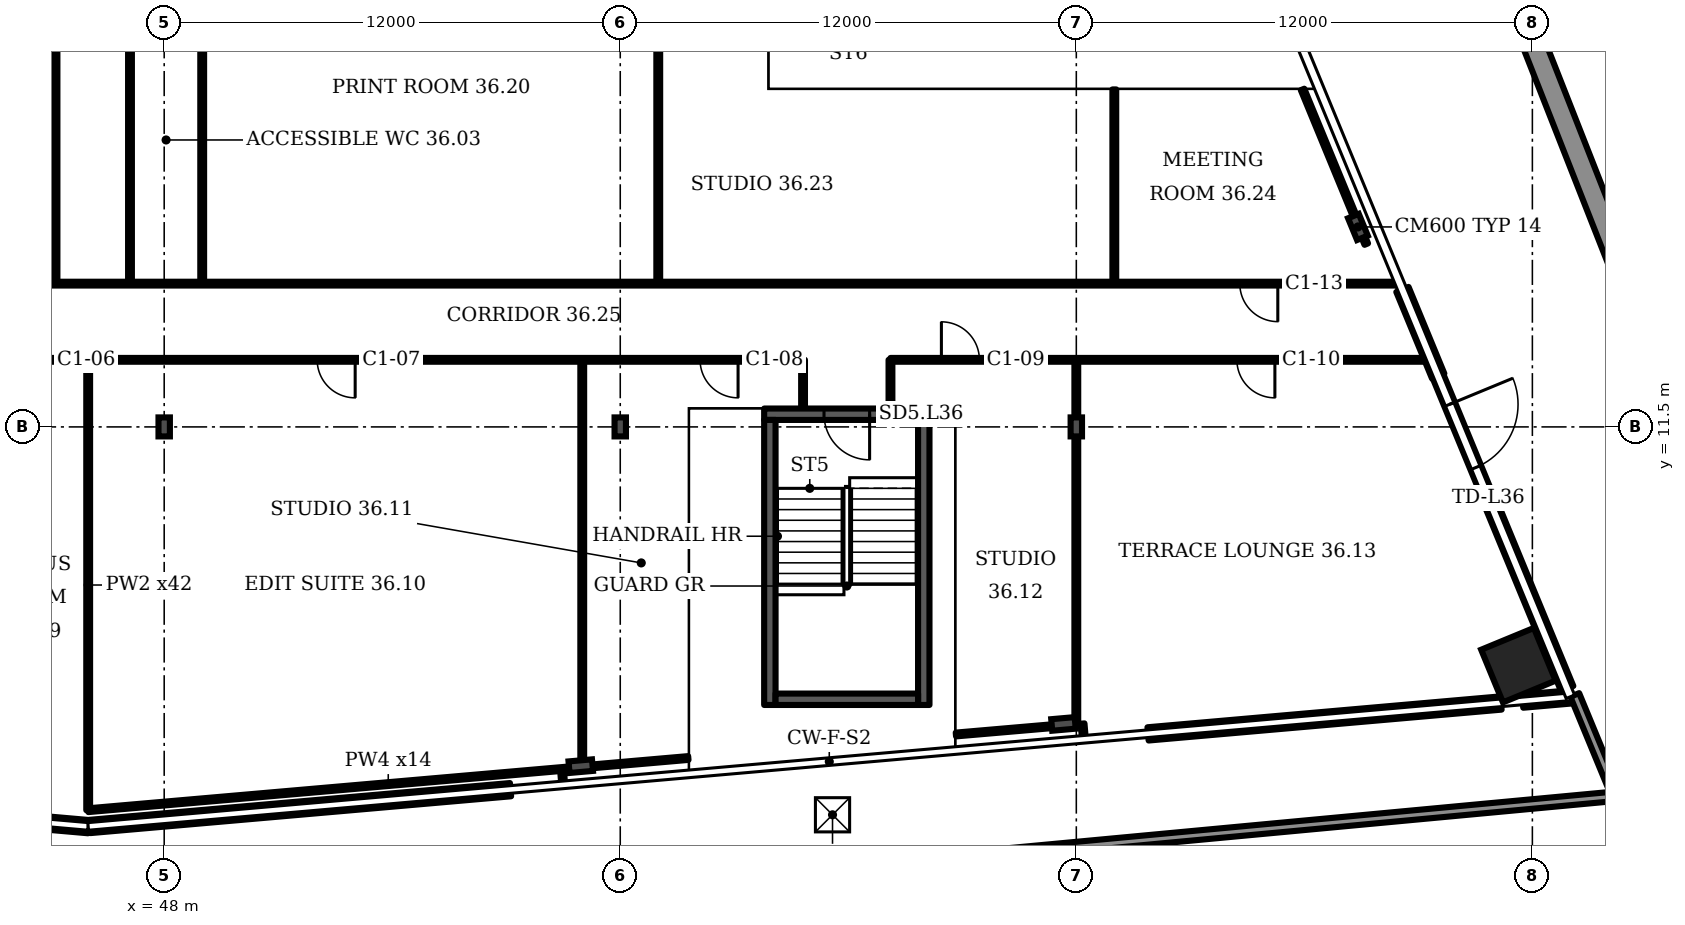
"""IFC4 building model, lengths in metres.
Left out: names, types, materials, properties, quantities, classifications, styles, units other than length and angle.
Written with IfcOpenShell. Run it as: python <this file> out.ifc"""

import sys

from ifc_helpers import new_model, si_unit, direction, frame, frame_2d, origin, origin_2d, place, context, subcontext, project, spatial, rectangle, i_section, extrude, element, fill, save


model = new_model("IFC4")
c1 = context("Model", 3, precision=1e-05, world=origin(), true_north=direction((0.0, 1.0)))
c2 = subcontext(c1, "Body", "Model", "MODEL_VIEW")
j1 = project(units=[si_unit("LENGTHUNIT", "METRE"), si_unit("PLANEANGLEUNIT", "RADIAN")], contexts=[c1])
p1 = place(None, origin())
s1 = spatial("IfcSite", under=j1, at=p1, CompositionType="ELEMENT")
p2 = place(p1, origin())
s2 = spatial("IfcBuilding", under=s1, at=p2, CompositionType="ELEMENT")
p3 = place(p2, frame((0.0, 0.0, 151.9)))
s3 = spatial("IfcBuildingStorey", under=s2, at=p3, CompositionType="ELEMENT", Elevation=151.9)
p4 = place(p3, frame((83.633, 5.231, 0.0), z_axis=(0.0, 0.0, 1.0), x_axis=(-0.381602, 0.924325, 0.0)))
e1 = element("IfcColumn", 1, at=p4, inside=s3, PredefinedType="COLUMN", context=c2, shape_type="SweptSolid", body=[
    extrude(rectangle(XDim=1.5, YDim=1.5, at=origin_2d()), origin(), (0.0, 0.0, 1.0), 3.6),
])
for number, where, z_axis, x_axis in (
    (2, (58.961, 2.573, 0.0), (0.0, 0.0, 1.0), (0.087, -0.996, 0.0)),
    (3, (71.662, 3.685, 0.0), (0.0, 0.0, 1.0), (0.087, -0.996, 0.0)),
    (4, (79.41, 16.762, 0.0), (0.0, 0.0, 1.0), (0.924, 0.382, 0.0)),
):
    element("IfcColumn", number, at=place(p3, frame(where, z_axis=z_axis, x_axis=x_axis)), inside=s3, PredefinedType="COLUMN", context=c2, shape_type="SweptSolid", body=[
        extrude(i_section(OverallWidth=0.305, OverallDepth=0.62, WebThickness=0.021, FlangeThickness=0.04, FilletRadius=0.027, at=origin_2d()), origin(), (0.0, 0.0, 1.0), 3.6),
    ])
for number, where, z_axis, x_axis in (
    (5, (48.0, 11.5, 0.0), (0.0, 0.0, 1.0), (1.0, 0.0, 0.0)),
    (6, (60.0, 11.5, 0.0), (0.0, 0.0, 1.0), (1.0, 0.0, 0.0)),
    (7, (72.0, 11.5, 0.0), (0.0, 0.0, 1.0), (1.0, 0.0, 0.0)),
):
    element("IfcColumn", number, at=place(p3, frame(where, z_axis=z_axis, x_axis=x_axis)), inside=s3, PredefinedType="COLUMN", context=c2, shape_type="SweptSolid", body=[
        extrude(i_section(OverallWidth=0.3, OverallDepth=0.5, WebThickness=0.014, FlangeThickness=0.028, FilletRadius=0.027, at=origin_2d()), origin(), (0.0, 0.0, 1.0), 3.6),
    ])
p5 = place(p3, frame((91.865, 2.313, 0.0), z_axis=(0.0, 0.0, 1.0), x_axis=(-0.995663, -0.092993, 0.0)))
e8 = element("IfcWall", 8, at=p5, inside=s3, PredefinedType="PARAPET", context=c2, shape_type="SweptSolid", body=[
    extrude(rectangle(XDim=42.549, YDim=0.25, at=frame_2d((21.274, 0.0))), origin(), (0.0, 0.0, 1.0), 1.1),
])
p6 = place(p3, frame((49.47, -1.641, 0.0), z_axis=(0.0, 0.0, 1.0), x_axis=(-0.996194, 0.087158, 0.0)))
e9 = element("IfcWall", 9, at=p6, inside=s3, PredefinedType="PARAPET", context=c2, shape_type="SweptSolid", body=[
    extrude(rectangle(XDim=36.86, YDim=0.25, at=frame_2d((18.43, 0.0))), origin(), (0.0, 0.0, 1.0), 1.1),
])
p7 = place(p3, frame((85.115, 4.448, 0.0), z_axis=(0.0, 0.0, 1.0), x_axis=(0.381619, -0.924318, 0.0)))
e10 = element("IfcWall", 10, at=p7, inside=s3, PredefinedType="PARAPET", context=c2, shape_type="SweptSolid", body=[
    extrude(rectangle(XDim=2.71, YDim=0.25, at=frame_2d((1.355, 0.0))), origin(), (0.0, 0.0, 1.0), 1.1),
])
p8 = place(p3, frame((76.426, 40.952, 0.0), z_axis=(0.0, 0.0, 1.0), x_axis=(0.365779, -0.930702, 0.0)))
e11 = element("IfcWall", 11, at=p8, inside=s3, PredefinedType="SOLIDWALL", context=c2, shape_type="SweptSolid", body=[
    extrude(rectangle(XDim=40.163, YDim=0.6, at=frame_2d((20.082, 0.0))), origin(), (0.0, 0.0, 1.0), 0.8),
])
p9 = place(p3, frame((35.03, 1.943, 0.0), z_axis=(0.0, 0.0, 1.0), x_axis=(0.996199, -0.08714, 0.0)))
e12 = element("IfcWall", 12, at=p9, inside=s3, PredefinedType="SOLIDWALL", context=c2, shape_type="SweptSolid", body=[
    extrude(rectangle(XDim=11.028, YDim=0.35, at=frame_2d((5.514, 0.0))), origin(), (0.0, 0.0, 1.0), 1.0),
])
p10 = place(p3, frame((46.045, 0.987, 0.0), z_axis=(0.0, 0.0, 1.0), x_axis=(0.996193, 0.087171, 0.0)))
e13 = element("IfcWall", 13, at=p10, inside=s3, PredefinedType="SOLIDWALL", context=c2, shape_type="SweptSolid", body=[
    extrude(rectangle(XDim=11.11, YDim=0.35, at=frame_2d((5.555, 0.0))), origin(), (0.0, 0.0, 1.0), 1.0),
])
p11 = place(p3, frame((73.887, 3.423, 0.0), z_axis=(0.0, 0.0, 1.0), x_axis=(0.996197, 0.087145, 0.0)))
e14 = element("IfcWall", 14, at=p11, inside=s3, PredefinedType="SOLIDWALL", context=c2, shape_type="SweptSolid", body=[
    extrude(rectangle(XDim=9.323, YDim=0.35, at=frame_2d((4.662, 0.0))), origin(), (0.0, 0.0, 1.0), 1.0),
])
p12 = place(p3, frame((83.745, 4.285, 0.0), z_axis=(0.0, 0.0, 1.0), x_axis=(0.996198, 0.087148, 0.0)))
e15 = element("IfcWall", 15, at=p12, inside=s3, PredefinedType="SOLIDWALL", context=c2, shape_type="SweptSolid", body=[
    extrude(rectangle(XDim=1.261, YDim=0.35, at=frame_2d((0.63, 0.0))), origin(), (0.0, 0.0, 1.0), 1.0),
])
p13 = place(p3, frame((84.916, 4.616, 0.0), z_axis=(0.0, 0.0, 1.0), x_axis=(-0.381607, 0.924328, 0.0)))
e16 = element("IfcWall", 16, at=p13, inside=s3, PredefinedType="SOLIDWALL", context=c2, shape_type="SweptSolid", body=[
    extrude(rectangle(XDim=5.493, YDim=0.35, at=frame_2d((2.747, 0.0))), origin(), (0.0, 0.0, 1.0), 1.0),
])
p14 = place(p3, frame((81.523, 12.836, 0.0), z_axis=(0.0, 0.0, 1.0), x_axis=(-0.381585, 0.924332, 0.0)))
e17 = element("IfcWall", 17, at=p14, inside=s3, PredefinedType="SOLIDWALL", context=c2, shape_type="SweptSolid", body=[
    extrude(rectangle(XDim=2.468, YDim=0.35, at=frame_2d((1.234, 0.0))), origin(), (0.0, 0.0, 1.0), 1.0),
])
p15 = place(p3, frame((63.786, 11.834, 0.0), z_axis=(0.0, 0.0, 1.0), x_axis=(1.0, 0.0, 0.0)))
e18 = element("IfcWall", 18, at=p15, inside=s3, PredefinedType="SHEAR", context=c2, shape_type="SweptSolid", body=[
    extrude(rectangle(XDim=4.35, YDim=0.3, at=frame_2d((2.175, 0.0))), origin(), (0.0, 0.0, 1.0), 3.2),
])
p16 = place(p15, frame((1.575, 0.0, 0.0)))
e19 = element("IfcOpeningElement", 19, at=p16, cuts=e18, PredefinedType="OPENING", context=c2, shape_type="SweptSolid", body=[
    extrude(rectangle(XDim=1.2, YDim=2.1, at=frame_2d((0.6, 1.05))), frame((0.0, 0.16, 0.0), z_axis=(0.0, -1.0, 0.0), x_axis=(1.0, 0.0, 0.0)), (0.0, 0.0, 1.0), 0.32),
])
p17 = place(p3, frame((18.2, 15.27, 0.0), z_axis=(0.0, 0.0, 1.0), x_axis=(1.0, 0.0, 0.0)))
e20 = element("IfcWall", 20, at=p17, inside=s3, PredefinedType="PARTITIONING", context=c2, shape_type="SweptSolid", body=[
    extrude(rectangle(XDim=62.291, YDim=0.1, at=frame_2d((31.146, 0.0))), origin(), (0.0, 0.0, 1.0), 2.58),
])
p18 = place(p17, frame((0.38, 0.0, 0.0)))
e21 = element("IfcOpeningElement", 21, at=p18, cuts=e20, PredefinedType="OPENING", context=c2, shape_type="SweptSolid", body=[
    extrude(rectangle(XDim=1.0, YDim=2.1, at=frame_2d((0.5, 1.05))), frame((0.0, 0.06, 0.0), z_axis=(0.0, -1.0, 0.0), x_axis=(1.0, 0.0, 0.0)), (0.0, 0.0, 1.0), 0.12),
])
p19 = place(p17, frame((58.102, 0.0, 0.0)))
e22 = element("IfcOpeningElement", 22, at=p19, cuts=e20, PredefinedType="OPENING", context=c2, shape_type="SweptSolid", body=[
    extrude(rectangle(XDim=1.0, YDim=2.1, at=frame_2d((0.5, 1.05))), frame((0.0, 0.06, 0.0), z_axis=(0.0, -1.0, 0.0), x_axis=(1.0, 0.0, 0.0)), (0.0, 0.0, 1.0), 0.12),
])
p20 = place(p3, frame((30.69, 13.265, 0.0), z_axis=(0.0, 0.0, 1.0), x_axis=(1.0, 0.0, 0.0)))
e23 = element("IfcWall", 23, at=p20, inside=s3, PredefinedType="PARTITIONING", context=c2, shape_type="SweptSolid", body=[
    extrude(rectangle(XDim=34.12, YDim=0.1, at=frame_2d((17.06, 0.0))), origin(), (0.0, 0.0, 1.0), 3.2),
])
p21 = place(p20, frame((2.825, 0.0, 0.0)))
e24 = element("IfcOpeningElement", 24, at=p21, cuts=e23, PredefinedType="OPENING", context=c2, shape_type="SweptSolid", body=[
    extrude(rectangle(XDim=1.0, YDim=2.1, at=frame_2d((0.5, 1.05))), frame((0.0, 0.06, 0.0), z_axis=(0.0, -1.0, 0.0), x_axis=(1.0, 0.0, 0.0)), (0.0, 0.0, 1.0), 0.12),
])
p22 = place(p20, frame((7.635, 0.0, 0.0)))
e25 = element("IfcOpeningElement", 25, at=p22, cuts=e23, PredefinedType="OPENING", context=c2, shape_type="SweptSolid", body=[
    extrude(rectangle(XDim=1.0, YDim=2.1, at=frame_2d((0.5, 1.05))), frame((0.0, 0.06, 0.0), z_axis=(0.0, -1.0, 0.0), x_axis=(1.0, 0.0, 0.0)), (0.0, 0.0, 1.0), 0.12),
])
p23 = place(p20, frame((10.47, 0.0, 0.0)))
e26 = element("IfcOpeningElement", 26, at=p23, cuts=e23, PredefinedType="OPENING", context=c2, shape_type="SweptSolid", body=[
    extrude(rectangle(XDim=1.0, YDim=2.1, at=frame_2d((0.5, 1.05))), frame((0.0, 0.06, 0.0), z_axis=(0.0, -1.0, 0.0), x_axis=(1.0, 0.0, 0.0)), (0.0, 0.0, 1.0), 0.12),
])
p24 = place(p20, frame((13.305, 0.0, 0.0)))
e27 = element("IfcOpeningElement", 27, at=p24, cuts=e23, PredefinedType="OPENING", context=c2, shape_type="SweptSolid", body=[
    extrude(rectangle(XDim=1.0, YDim=2.1, at=frame_2d((0.5, 1.05))), frame((0.0, 0.06, 0.0), z_axis=(0.0, -1.0, 0.0), x_axis=(1.0, 0.0, 0.0)), (0.0, 0.0, 1.0), 0.12),
])
p25 = place(p20, frame((21.335, 0.0, 0.0)))
e28 = element("IfcOpeningElement", 28, at=p25, cuts=e23, PredefinedType="OPENING", context=c2, shape_type="SweptSolid", body=[
    extrude(rectangle(XDim=1.0, YDim=2.1, at=frame_2d((0.5, 1.05))), frame((0.0, 0.06, 0.0), z_axis=(0.0, -1.0, 0.0), x_axis=(1.0, 0.0, 0.0)), (0.0, 0.0, 1.0), 0.12),
])
p26 = place(p20, frame((31.41, 0.0, 0.0)))
e29 = element("IfcOpeningElement", 29, at=p26, cuts=e23, PredefinedType="OPENING", context=c2, shape_type="SweptSolid", body=[
    extrude(rectangle(XDim=1.0, YDim=2.1, at=frame_2d((0.5, 1.05))), frame((0.0, 0.06, 0.0), z_axis=(0.0, -1.0, 0.0), x_axis=(1.0, 0.0, 0.0)), (0.0, 0.0, 1.0), 0.12),
])
p27 = place(p3, frame((45.14, 15.27, 0.0), z_axis=(0.0, 0.0, 1.0), x_axis=(0.0, 1.0, 0.0)))
e30 = element("IfcWall", 30, at=p27, inside=s3, PredefinedType="PARTITIONING", context=c2, shape_type="SweptSolid", body=[
    extrude(rectangle(XDim=13.43, YDim=0.1, at=frame_2d((6.715, 0.0))), origin(), (0.0, 0.0, 1.0), 3.2),
])
p28 = place(p3, frame((46.0, 1.415, 0.0), z_axis=(0.0, 0.0, 1.0), x_axis=(0.996241, 0.086637, 0.0)))
e31 = element("IfcWall", 31, at=p28, inside=s3, PredefinedType="PARTITIONING", context=c2, shape_type="SweptSolid", body=[
    extrude(rectangle(XDim=15.851, YDim=0.1, at=frame_2d((7.926, 0.0))), origin(), (0.0, 0.0, 1.0), 2.58),
])
p29 = place(p3, frame((46.0, 1.415, 0.0), z_axis=(0.0, 0.0, 1.0), x_axis=(0.0, 1.0, 0.0)))
e32 = element("IfcWall", 32, at=p29, inside=s3, PredefinedType="PARTITIONING", context=c2, shape_type="SweptSolid", body=[
    extrude(rectangle(XDim=11.85, YDim=0.1, at=frame_2d((5.925, 0.0))), origin(), (0.0, 0.0, 1.0), 3.2),
])
for number, where, z_axis, x_axis in (
    (33, (47.1, 15.27, 0.0), (0.0, 0.0, 1.0), (0.0, 1.0, 0.0)),
    (34, (49.0, 15.27, 0.0), (0.0, 0.0, 1.0), (0.0, 1.0, 0.0)),
):
    element("IfcWall", number, at=place(p3, frame(where, z_axis=z_axis, x_axis=x_axis)), inside=s3, PredefinedType="PARTITIONING", context=c2, shape_type="SweptSolid", body=[
        extrude(rectangle(XDim=13.43, YDim=0.1, at=frame_2d((6.715, 0.0))), origin(), (0.0, 0.0, 1.0), 3.2),
    ])
p30 = place(p3, frame((58.498, 2.102, 0.0), z_axis=(0.0, 0.0, 1.0), x_axis=(-0.083045, 0.996542, 0.0)))
e35 = element("IfcWall", 35, at=p30, inside=s3, PredefinedType="PARTITIONING", context=c2, shape_type="SweptSolid", body=[
    extrude(rectangle(XDim=0.4, YDim=0.1, at=frame_2d((0.2, 0.0))), origin(), (0.0, 0.0, 1.0), 3.2),
])
p31 = place(p3, frame((59.0, 2.545, 0.0), z_axis=(0.0, 0.0, 1.0), x_axis=(0.0, 1.0, 0.0)))
e36 = element("IfcWall", 36, at=p31, inside=s3, PredefinedType="PARTITIONING", context=c2, shape_type="SweptSolid", body=[
    extrude(rectangle(XDim=10.72, YDim=0.1, at=frame_2d((5.36, 0.0))), origin(), (0.0, 0.0, 1.0), 3.2),
])
p32 = place(p3, frame((61.0, 15.27, 0.0), z_axis=(0.0, 0.0, 1.0), x_axis=(0.0, 1.0, 0.0)))
e37 = element("IfcWall", 37, at=p32, inside=s3, PredefinedType="PARTITIONING", context=c2, shape_type="SweptSolid", body=[
    extrude(rectangle(XDim=14.33, YDim=0.1, at=frame_2d((7.165, 0.0))), origin(), (0.0, 0.0, 1.0), 3.2),
])
for number, where, z_axis, x_axis in (
    (38, (64.81, 12.004, 0.0), (0.0, 0.0, 1.0), (0.0, 1.0, 0.0)),
    (39, (67.11, 12.004, 0.0), (0.0, 0.0, 1.0), (0.0, 1.0, 0.0)),
):
    element("IfcWall", number, at=place(p3, frame(where, z_axis=z_axis, x_axis=x_axis)), inside=s3, PredefinedType="PARTITIONING", context=c2, shape_type="SweptSolid", body=[
        extrude(rectangle(XDim=1.261, YDim=0.1, at=frame_2d((0.631, 0.0))), origin(), (0.0, 0.0, 1.0), 3.2),
    ])
p33 = place(p3, frame((67.11, 13.265, 0.0), z_axis=(0.0, 0.0, 1.0), x_axis=(1.0, 0.0, 0.0)))
e40 = element("IfcWall", 40, at=p33, inside=s3, PredefinedType="PARTITIONING", context=c2, shape_type="SweptSolid", body=[
    extrude(rectangle(XDim=14.208, YDim=0.1, at=frame_2d((7.104, 0.0))), origin(), (0.0, 0.0, 1.0), 2.58),
])
p34 = place(p33, frame((1.34, 0.0, 0.0)))
e41 = element("IfcOpeningElement", 41, at=p34, cuts=e40, PredefinedType="OPENING", context=c2, shape_type="SweptSolid", body=[
    extrude(rectangle(XDim=1.0, YDim=2.1, at=frame_2d((0.5, 1.05))), frame((0.0, 0.06, 0.0), z_axis=(0.0, -1.0, 0.0), x_axis=(1.0, 0.0, 0.0)), (0.0, 0.0, 1.0), 0.12),
])
p35 = place(p33, frame((9.115, 0.0, 0.0)))
e42 = element("IfcOpeningElement", 42, at=p35, cuts=e40, PredefinedType="OPENING", context=c2, shape_type="SweptSolid", body=[
    extrude(rectangle(XDim=1.0, YDim=2.1, at=frame_2d((0.5, 1.05))), frame((0.0, 0.06, 0.0), z_axis=(0.0, -1.0, 0.0), x_axis=(1.0, 0.0, 0.0)), (0.0, 0.0, 1.0), 0.12),
])
p36 = place(p3, frame((68.831, 3.407, 0.0), z_axis=(0.0, 0.0, 1.0), x_axis=(0.996308, 0.085898, 0.0)))
e43 = element("IfcWall", 43, at=p36, inside=s3, PredefinedType="PARTITIONING", context=c2, shape_type="SweptSolid", body=[
    extrude(rectangle(XDim=3.18, YDim=0.1, at=frame_2d((1.59, 0.0))), origin(), (0.0, 0.0, 1.0), 2.58),
])
p37 = place(p3, frame((72.0, 3.68, 0.0), z_axis=(0.0, 0.0, 1.0), x_axis=(0.0, 1.0, 0.0)))
e44 = element("IfcWall", 44, at=p37, inside=s3, PredefinedType="PARTITIONING", context=c2, shape_type="SweptSolid", body=[
    extrude(rectangle(XDim=9.585, YDim=0.1, at=frame_2d((4.792, 0.0))), origin(), (0.0, 0.0, 1.0), 3.2),
])
p38 = place(p3, frame((72.198, 3.3, 0.0), z_axis=(0.0, 0.0, 1.0), x_axis=(-0.083759, 0.996486, 0.0)))
e45 = element("IfcWall", 45, at=p38, inside=s3, PredefinedType="PARTITIONING", context=c2, shape_type="SweptSolid", body=[
    extrude(rectangle(XDim=0.396, YDim=0.1, at=frame_2d((0.198, 0.0))), origin(), (0.0, 0.0, 1.0), 3.2),
])
p39 = place(p3, frame((73.0, 15.27, 0.0), z_axis=(0.0, 0.0, 1.0), x_axis=(0.0, 1.0, 0.0)))
e46 = element("IfcWall", 46, at=p39, inside=s3, PredefinedType="PARTITIONING", context=c2, shape_type="SweptSolid", body=[
    extrude(rectangle(XDim=5.11, YDim=0.1, at=frame_2d((2.555, 0.0))), origin(), (0.0, 0.0, 1.0), 3.2),
])
p40 = place(p3, frame((79.63, 16.31, 0.0), z_axis=(0.0, 0.0, 1.0), x_axis=(-0.380933, 0.9246, 0.0)))
e47 = element("IfcWall", 47, at=p40, inside=s3, PredefinedType="PARTITIONING", context=c2, shape_type="SweptSolid", body=[
    extrude(rectangle(XDim=4.402, YDim=0.1, at=frame_2d((2.201, 0.0))), origin(), (0.0, 0.0, 1.0), 2.58),
])
p41 = place(p3, frame((81.518, 12.834, 0.0), z_axis=(0.0, 0.0, 1.0), x_axis=(0.381594, -0.924328, 0.0)))
e48 = element("IfcWall", 48, at=p41, inside=s3, PredefinedType="SOLIDWALL", context=c2, shape_type="SweptSolid", body=[
    extrude(rectangle(XDim=3.4, YDim=0.3, at=frame_2d((1.7, 0.0))), origin(), (0.0, 0.0, 1.0), 3.2),
])
p42 = place(p41, frame((0.8, 0.0, 0.0)))
e49 = element("IfcOpeningElement", 49, at=p42, cuts=e48, PredefinedType="OPENING", context=c2, shape_type="SweptSolid", body=[
    extrude(rectangle(XDim=1.8, YDim=2.1, at=frame_2d((0.9, 1.05))), frame((0.0, 0.16, 0.0), z_axis=(0.0, -1.0, 0.0), x_axis=(1.0, 0.0, 0.0)), (0.0, 0.0, 1.0), 0.32),
])
for number, where, z_axis, x_axis in (
    (50, (63.936, 4.184, 0.0), (0.0, 0.0, 1.0), (0.0, 1.0, 0.0)),
    (51, (67.986, 4.184, 0.0), (0.0, 0.0, 1.0), (0.0, 1.0, 0.0)),
):
    element("IfcWall", number, at=place(p3, frame(where, z_axis=z_axis, x_axis=x_axis)), inside=s3, PredefinedType="SHEAR", context=c2, shape_type="SweptSolid", body=[
        extrude(rectangle(XDim=7.5, YDim=0.3, at=frame_2d((3.75, 0.0))), origin(), (0.0, 0.0, 1.0), 3.2),
    ])
p43 = place(p3, frame((64.086, 4.334, 0.0), z_axis=(0.0, 0.0, 1.0), x_axis=(1.0, 0.0, 0.0)))
e52 = element("IfcWall", 52, at=p43, inside=s3, PredefinedType="SHEAR", context=c2, shape_type="SweptSolid", body=[
    extrude(rectangle(XDim=3.75, YDim=0.3, at=frame_2d((1.875, 0.0))), origin(), (0.0, 0.0, 1.0), 3.2),
])
p44 = place(p3, frame((0.0, 0.0, -0.4)))
p45 = place(p44, frame((65.585, 1.294, 0.0)))
p46 = place(p45, frame((0.0, 0.0, 0.36)))
e53 = element("IfcDoor", 53, at=p46, inside=s3, OperationType="SINGLE_SWING_LEFT", PredefinedType="TRAPDOOR", context=c2, shape_type="SweptSolid", body=[
    extrude(rectangle(XDim=0.9, YDim=0.9, at=origin_2d()), origin(), (0.0, 0.0, 1.0), 0.05),
])
p47 = place(p16, origin())
e54 = element("IfcDoor", 54, at=p47, inside=s3, OperationType="SINGLE_SWING_RIGHT", PredefinedType="DOOR", context=c2, shape_type="SweptSolid", body=[
    extrude(rectangle(XDim=1.2, YDim=2.1, at=frame_2d((0.6, 1.05))), frame((0.0, 0.025, 0.0), z_axis=(0.0, -1.0, 0.0), x_axis=(1.0, 0.0, 0.0)), (0.0, 0.0, 1.0), 0.05),
])
fill(e19, e54)
p48 = place(p25, origin())
e55 = element("IfcDoor", 55, at=p48, inside=s3, OperationType="SINGLE_SWING_RIGHT", PredefinedType="DOOR", context=c2, shape_type="SweptSolid", body=[
    extrude(rectangle(XDim=1.0, YDim=2.1, at=frame_2d((0.5, 1.05))), frame((0.0, 0.025, 0.0), z_axis=(0.0, -1.0, 0.0), x_axis=(1.0, 0.0, 0.0)), (0.0, 0.0, 1.0), 0.05),
])
fill(e28, e55)
p49 = place(p26, origin())
e56 = element("IfcDoor", 56, at=p49, inside=s3, OperationType="SINGLE_SWING_RIGHT", PredefinedType="DOOR", context=c2, shape_type="SweptSolid", body=[
    extrude(rectangle(XDim=1.0, YDim=2.1, at=frame_2d((0.5, 1.05))), frame((0.0, 0.025, 0.0), z_axis=(0.0, -1.0, 0.0), x_axis=(1.0, 0.0, 0.0)), (0.0, 0.0, 1.0), 0.05),
])
fill(e29, e56)
p50 = place(p34, origin())
e57 = element("IfcDoor", 57, at=p50, inside=s3, OperationType="SINGLE_SWING_LEFT", PredefinedType="DOOR", context=c2, shape_type="SweptSolid", body=[
    extrude(rectangle(XDim=1.0, YDim=2.1, at=frame_2d((0.5, 1.05))), frame((0.0, 0.025, 0.0), z_axis=(0.0, -1.0, 0.0), x_axis=(1.0, 0.0, 0.0)), (0.0, 0.0, 1.0), 0.05),
])
fill(e41, e57)
p51 = place(p35, origin())
e58 = element("IfcDoor", 58, at=p51, inside=s3, OperationType="SINGLE_SWING_RIGHT", PredefinedType="DOOR", context=c2, shape_type="SweptSolid", body=[
    extrude(rectangle(XDim=1.0, YDim=2.1, at=frame_2d((0.5, 1.05))), frame((0.0, 0.025, 0.0), z_axis=(0.0, -1.0, 0.0), x_axis=(1.0, 0.0, 0.0)), (0.0, 0.0, 1.0), 0.05),
])
fill(e42, e58)
p52 = place(p19, origin())
e59 = element("IfcDoor", 59, at=p52, inside=s3, OperationType="SINGLE_SWING_RIGHT", PredefinedType="DOOR", context=c2, shape_type="SweptSolid", body=[
    extrude(rectangle(XDim=1.0, YDim=2.1, at=frame_2d((0.5, 1.05))), frame((0.0, 0.025, 0.0), z_axis=(0.0, -1.0, 0.0), x_axis=(1.0, 0.0, 0.0)), (0.0, 0.0, 1.0), 0.05),
])
fill(e22, e59)
p53 = place(p42, origin())
e60 = element("IfcDoor", 60, at=p53, inside=s3, OperationType="DOUBLE_DOOR_SINGLE_SWING", PredefinedType="DOOR", context=c2, shape_type="SweptSolid", body=[
    extrude(rectangle(XDim=1.8, YDim=2.1, at=frame_2d((0.9, 1.05))), frame((0.0, 0.025, 0.0), z_axis=(0.0, -1.0, 0.0), x_axis=(1.0, 0.0, 0.0)), (0.0, 0.0, 1.0), 0.05),
])
fill(e49, e60)
save(model, sys.argv[1])
